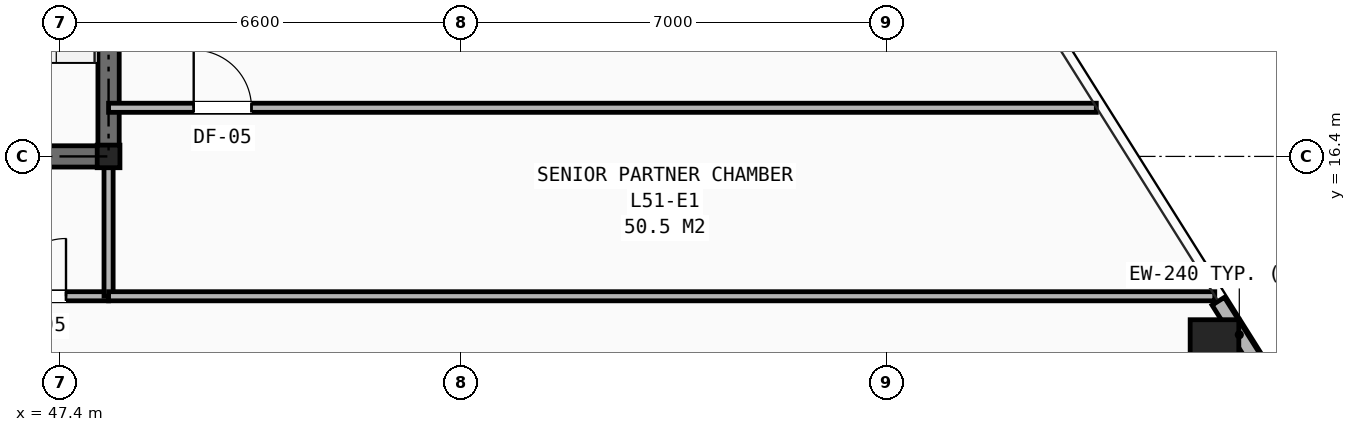
"""IFC4 building model, lengths in metres.
Left out: names, types, materials, properties, quantities, classifications, styles, units other than length and angle.
Written with IfcOpenShell. Run it as: python <this file> out.ifc"""

import sys

from ifc_helpers import new_model, si_unit, direction, frame, frame_2d, origin, origin_2d, place, context, subcontext, project, spatial, rectangle, hollow_rectangle, i_section, extrude, element, fill, save


model = new_model("IFC4")
c1 = context("Model", 3, precision=1e-05, world=origin(), true_north=direction((0.0, 1.0)))
c2 = subcontext(c1, "Body", "Model", "MODEL_VIEW")
j1 = project(units=[si_unit("LENGTHUNIT", "METRE"), si_unit("PLANEANGLEUNIT", "RADIAN")], contexts=[c1])
p1 = place(None, origin())
s1 = spatial("IfcSite", under=j1, at=p1, CompositionType="ELEMENT")
p2 = place(p1, origin())
s2 = spatial("IfcBuilding", under=s1, at=p2, CompositionType="ELEMENT")
p3 = place(p2, frame((0.0, 0.0, 179.25)))
s3 = spatial("IfcBuildingStorey", under=s2, at=p3, CompositionType="ELEMENT", Elevation=179.25)
p4 = place(p3, frame((48.2, 16.4, 0.0), z_axis=(0.0, 0.0, 1.0), x_axis=(1.0, 0.0, 0.0)))
e1 = element("IfcColumn", 1, at=p4, inside=s3, PredefinedType="COLUMN", context=c2, shape_type="SweptSolid", body=[
    extrude(i_section(OverallWidth=0.374, OverallDepth=0.372, WebThickness=0.016, FlangeThickness=0.026, at=origin_2d()), origin(), (0.0, 0.0, 1.0), 3.45),
])
p5 = place(p3, frame((66.388, 13.314, 0.0), z_axis=(0.0, 0.0, 1.0), x_axis=(1.0, 0.0, 0.0)))
e2 = element("IfcColumn", 2, at=p5, inside=s3, PredefinedType="COLUMN", context=c2, shape_type="SweptSolid", body=[
    extrude(hollow_rectangle(XDim=0.8, YDim=0.8, WallThickness=0.055, at=origin_2d()), origin(), (0.0, 0.0, 1.0), 3.45),
])
p6 = place(p3, frame((67.142, 12.916, 0.0), z_axis=(0.0, 0.0, 1.0), x_axis=(-0.531987132085, 0.846752438022, 0.0)))
e3 = element("IfcWall", 3, at=p6, inside=s3, PredefinedType="SHEAR", context=c2, shape_type="SweptSolid", body=[
    extrude(rectangle(XDim=1.302, YDim=0.24, at=frame_2d((0.651, 0.0))), origin(), (0.0, 0.0, 1.0), 2.583),
])
p7 = place(p3, frame((31.8, 16.4, 0.0), z_axis=(0.0, 0.0, 1.0), x_axis=(1.0, 0.0, 0.0)))
e4 = element("IfcWall", 4, at=p7, inside=s3, PredefinedType="SHEAR", context=c2, shape_type="SweptSolid", body=[
    extrude(rectangle(XDim=16.4, YDim=0.35, at=frame_2d((8.2, 0.0))), origin(), (0.0, 0.0, 1.0), 3.21),
])
p8 = place(p7, frame((7.75, 0.0, 0.0)))
e5 = element("IfcOpeningElement", 5, at=p8, cuts=e4, PredefinedType="OPENING", context=c2, shape_type="SweptSolid", body=[
    extrude(rectangle(XDim=0.9, YDim=2.1, at=frame_2d((0.45, 1.05))), frame((0.0, 0.185, 0.0), z_axis=(0.0, -1.0, 0.0), x_axis=(1.0, 0.0, 0.0)), (0.0, 0.0, 1.0), 0.37),
])
p9 = place(p7, frame((4.2, 0.0, 0.0)))
e6 = element("IfcOpeningElement", 6, at=p9, cuts=e4, PredefinedType="OPENING", context=c2, shape_type="SweptSolid", body=[
    extrude(rectangle(XDim=0.95, YDim=2.1, at=frame_2d((0.475, 1.05))), frame((0.0, 0.185, 0.0), z_axis=(0.0, -1.0, 0.0), x_axis=(1.0, 0.0, 0.0)), (0.0, 0.0, 1.0), 0.37),
])
p10 = place(p7, frame((10.6, 0.0, 0.0)))
e7 = element("IfcOpeningElement", 7, at=p10, cuts=e4, PredefinedType="OPENING", context=c2, shape_type="SweptSolid", body=[
    extrude(rectangle(XDim=0.95, YDim=2.1, at=frame_2d((0.475, 1.05))), frame((0.0, 0.185, 0.0), z_axis=(0.0, -1.0, 0.0), x_axis=(1.0, 0.0, 0.0)), (0.0, 0.0, 1.0), 0.37),
])
p11 = place(p3, frame((48.2, 16.4, 0.0), z_axis=(0.0, 0.0, 1.0), x_axis=(0.0, 1.0, 0.0)))
e8 = element("IfcWall", 8, at=p11, inside=s3, PredefinedType="SHEAR", context=c2, shape_type="SweptSolid", body=[
    extrude(rectangle(XDim=14.8, YDim=0.35, at=frame_2d((7.4, 0.0))), origin(), (0.0, 0.0, 1.0), 3.21),
])
p12 = place(p11, frame((11.0, 0.0, 0.0)))
e9 = element("IfcOpeningElement", 9, at=p12, cuts=e8, PredefinedType="OPENING", context=c2, shape_type="SweptSolid", body=[
    extrude(rectangle(XDim=1.1, YDim=2.15, at=frame_2d((0.55, 1.075))), frame((0.0, 0.185, 0.0), z_axis=(0.0, -1.0, 0.0), x_axis=(1.0, 0.0, 0.0)), (0.0, 0.0, 1.0), 0.37),
])
p13 = place(p3, frame((29.6, 14.1, 0.0), z_axis=(0.0, 0.0, 1.0), x_axis=(1.0, 0.0, 0.0)))
e10 = element("IfcWall", 10, at=p13, inside=s3, PredefinedType="PARTITIONING", context=c2, shape_type="SweptSolid", body=[
    extrude(rectangle(XDim=18.6, YDim=0.15, at=frame_2d((9.3, 0.0))), origin(), (0.0, 0.0, 1.0), 2.225),
])
p14 = place(p13, frame((0.55, 0.0, 0.0)))
e11 = element("IfcOpeningElement", 11, at=p14, cuts=e10, PredefinedType="OPENING", context=c2, shape_type="SweptSolid", body=[
    extrude(rectangle(XDim=0.95, YDim=2.1, at=frame_2d((0.475, 1.05))), frame((0.0, 0.085, 0.0), z_axis=(0.0, -1.0, 0.0), x_axis=(1.0, 0.0, 0.0)), (0.0, 0.0, 1.0), 0.17),
])
p15 = place(p13, frame((2.25, 0.0, 0.0)))
e12 = element("IfcOpeningElement", 12, at=p15, cuts=e10, PredefinedType="OPENING", context=c2, shape_type="SweptSolid", body=[
    extrude(rectangle(XDim=0.95, YDim=2.1, at=frame_2d((0.475, 1.05))), frame((0.0, 0.085, 0.0), z_axis=(0.0, -1.0, 0.0), x_axis=(1.0, 0.0, 0.0)), (0.0, 0.0, 1.0), 0.17),
])
p16 = place(p13, frame((5.95, 0.0, 0.0)))
e13 = element("IfcOpeningElement", 13, at=p16, cuts=e10, PredefinedType="OPENING", context=c2, shape_type="SweptSolid", body=[
    extrude(rectangle(XDim=0.95, YDim=2.1, at=frame_2d((0.475, 1.05))), frame((0.0, 0.085, 0.0), z_axis=(0.0, -1.0, 0.0), x_axis=(1.0, 0.0, 0.0)), (0.0, 0.0, 1.0), 0.17),
])
p17 = place(p13, frame((9.75, 0.0, 0.0)))
e14 = element("IfcOpeningElement", 14, at=p17, cuts=e10, PredefinedType="OPENING", context=c2, shape_type="SweptSolid", body=[
    extrude(rectangle(XDim=0.95, YDim=2.1, at=frame_2d((0.475, 1.05))), frame((0.0, 0.085, 0.0), z_axis=(0.0, -1.0, 0.0), x_axis=(1.0, 0.0, 0.0)), (0.0, 0.0, 1.0), 0.17),
])
p18 = place(p13, frame((13.55, 0.0, 0.0)))
e15 = element("IfcOpeningElement", 15, at=p18, cuts=e10, PredefinedType="OPENING", context=c2, shape_type="SweptSolid", body=[
    extrude(rectangle(XDim=0.95, YDim=2.1, at=frame_2d((0.475, 1.05))), frame((0.0, 0.085, 0.0), z_axis=(0.0, -1.0, 0.0), x_axis=(1.0, 0.0, 0.0)), (0.0, 0.0, 1.0), 0.17),
])
p19 = place(p13, frame((16.95, 0.0, 0.0)))
e16 = element("IfcOpeningElement", 16, at=p19, cuts=e10, PredefinedType="OPENING", context=c2, shape_type="SweptSolid", body=[
    extrude(rectangle(XDim=0.95, YDim=2.1, at=frame_2d((0.475, 1.05))), frame((0.0, 0.085, 0.0), z_axis=(0.0, -1.0, 0.0), x_axis=(1.0, 0.0, 0.0)), (0.0, 0.0, 1.0), 0.17),
])
p20 = place(p3, frame((48.2, 14.1, 0.0), z_axis=(0.0, 0.0, 1.0), x_axis=(0.0, 1.0, 0.0)))
e17 = element("IfcWall", 17, at=p20, inside=s3, PredefinedType="PARTITIONING", context=c2, shape_type="SweptSolid", body=[
    extrude(rectangle(XDim=2.3, YDim=0.15, at=frame_2d((1.15, 0.0))), origin(), (0.0, 0.0, 1.0), 2.665),
])
p21 = place(p3, frame((48.2, 14.1, 0.0), z_axis=(0.0, 0.0, 1.0), x_axis=(1.0, 0.0, 0.0)))
e18 = element("IfcWall", 18, at=p21, inside=s3, PredefinedType="PARTITIONING", context=c2, shape_type="SweptSolid", body=[
    extrude(rectangle(XDim=18.192, YDim=0.15, at=frame_2d((9.096, 0.0))), origin(), (0.0, 0.0, 1.0), 2.589),
])
p22 = place(p3, frame((48.2, 17.2, 0.0), z_axis=(0.0, 0.0, 1.0), x_axis=(1.0, 0.0, 0.0)))
e19 = element("IfcWall", 19, at=p22, inside=s3, PredefinedType="PARTITIONING", context=c2, shape_type="SweptSolid", body=[
    extrude(rectangle(XDim=16.244, YDim=0.15, at=frame_2d((8.122, 0.0))), origin(), (0.0, 0.0, 1.0), 2.589),
])
p23 = place(p22, frame((1.4, 0.0, 0.0)))
e20 = element("IfcOpeningElement", 20, at=p23, cuts=e19, PredefinedType="OPENING", context=c2, shape_type="SweptSolid", body=[
    extrude(rectangle(XDim=0.95, YDim=2.1, at=frame_2d((0.475, 1.05))), frame((0.0, 0.085, 0.0), z_axis=(0.0, -1.0, 0.0), x_axis=(1.0, 0.0, 0.0)), (0.0, 0.0, 1.0), 0.17),
])
p24 = place(p19, origin())
e21 = element("IfcDoor", 21, at=p24, inside=s3, OperationType="SINGLE_SWING_RIGHT", PredefinedType="DOOR", context=c2, shape_type="SweptSolid", body=[
    extrude(rectangle(XDim=0.95, YDim=2.1, at=frame_2d((0.475, 1.05))), frame((0.0, 0.025, 0.0), z_axis=(0.0, -1.0, 0.0), x_axis=(1.0, 0.0, 0.0)), (0.0, 0.0, 1.0), 0.05),
])
fill(e16, e21)
p25 = place(p23, origin())
e22 = element("IfcDoor", 22, at=p25, inside=s3, OperationType="SINGLE_SWING_LEFT", PredefinedType="DOOR", context=c2, shape_type="SweptSolid", body=[
    extrude(rectangle(XDim=0.95, YDim=2.1, at=frame_2d((0.475, 1.05))), frame((0.0, 0.025, 0.0), z_axis=(0.0, -1.0, 0.0), x_axis=(1.0, 0.0, 0.0)), (0.0, 0.0, 1.0), 0.05),
])
fill(e20, e22)
save(model, sys.argv[1])
